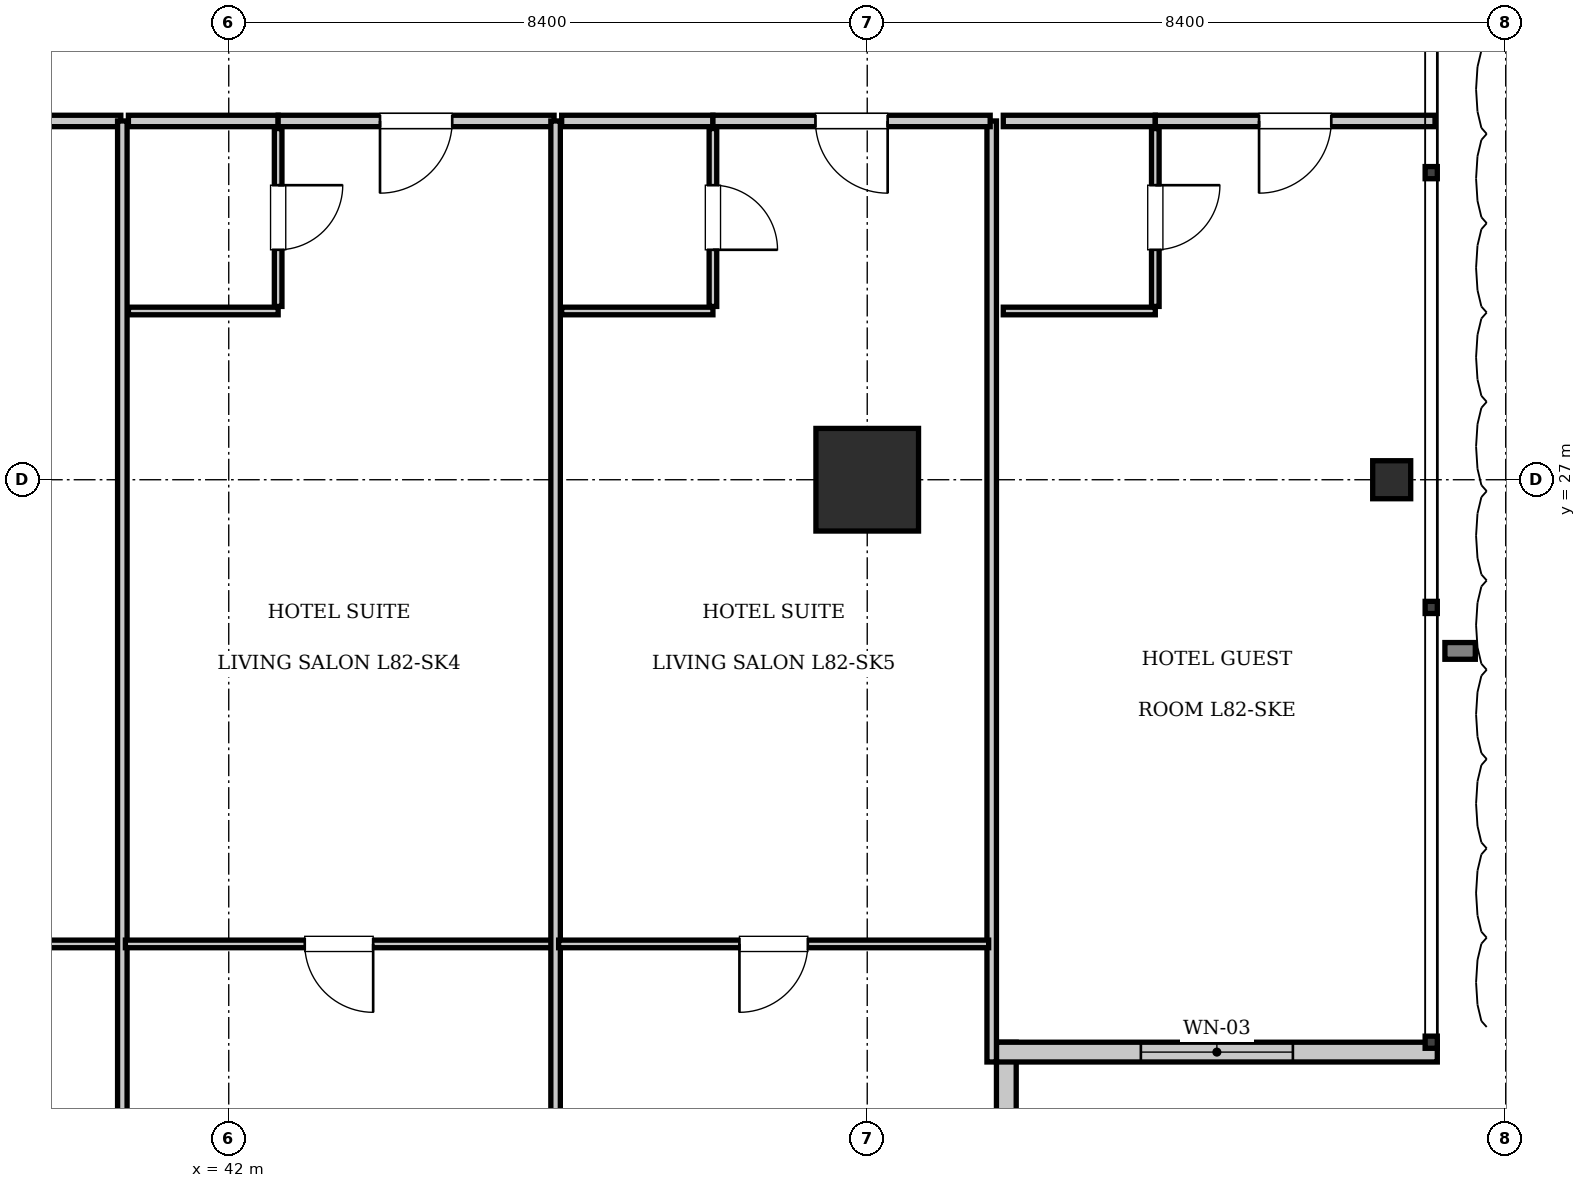
"""IFC4 building model, lengths in metres.
Left out: names, types, materials, properties, quantities, classifications, styles, units other than length and angle.
Written with IfcOpenShell. Run it as: python <this file> out.ifc"""

import sys

from ifc_helpers import new_model, si_unit, direction, frame, frame_2d, origin, origin_2d, place, context, subcontext, project, spatial, rectangle, i_section, extrude, element, fill, save


model = new_model("IFC4")
c1 = context("Model", 3, precision=1e-05, world=origin(), true_north=direction((0.0, 1.0)))
c2 = subcontext(c1, "Body", "Model", "MODEL_VIEW")
j1 = project(units=[si_unit("LENGTHUNIT", "METRE"), si_unit("PLANEANGLEUNIT", "RADIAN")], contexts=[c1])
p1 = place(None, origin())
s1 = spatial("IfcSite", under=j1, at=p1, CompositionType="ELEMENT")
p2 = place(p1, origin())
s2 = spatial("IfcBuilding", under=s1, at=p2, CompositionType="ELEMENT")
p3 = place(p2, frame((0.0, 0.0, 333.55)))
s3 = spatial("IfcBuildingStorey", under=s2, at=p3, CompositionType="ELEMENT", Elevation=333.55)
p4 = place(p3, frame((50.4, 27.0, 0.0), z_axis=(0.0, 0.0, 1.0), x_axis=(1.0, 0.0, 0.0)))
e1 = element("IfcColumn", 1, at=p4, inside=s3, PredefinedType="COLUMN", context=c2, shape_type="SweptSolid", body=[
    extrude(rectangle(XDim=1.35, YDim=1.35, at=origin_2d()), origin(), (0.0, 0.0, 1.0), 3.85),
])
p5 = place(p3, frame((57.3, 27.0, 0.0), z_axis=(0.0, 0.0, 1.0), x_axis=(1.0, 0.0, 0.0)))
e2 = element("IfcColumn", 2, at=p5, inside=s3, PredefinedType="COLUMN", context=c2, shape_type="SweptSolid", body=[
    extrude(i_section(OverallWidth=0.5, OverallDepth=0.5, WebThickness=0.022, FlangeThickness=0.032, at=origin_2d()), origin(), (0.0, 0.0, 1.0), 3.85),
])
p6 = place(p3, frame((52.23, 19.6, 0.0), z_axis=(0.0, 0.0, 1.0), x_axis=(0.0, -1.0, 0.0)))
e3 = element("IfcWall", 3, at=p6, inside=s3, PredefinedType="SOLIDWALL", context=c2, shape_type="SweptSolid", body=[
    extrude(rectangle(XDim=5.8, YDim=0.26, at=frame_2d((2.9, 0.0))), origin(), (0.0, 0.0, 1.0), 3.61),
])
p7 = place(p3, frame((57.9, 19.47, 0.0), z_axis=(0.0, 0.0, 1.0), x_axis=(-1.0, 0.0, 0.0)))
e4 = element("IfcWall", 4, at=p7, inside=s3, PredefinedType="SOLIDWALL", context=c2, shape_type="SweptSolid", body=[
    extrude(rectangle(XDim=5.8, YDim=0.26, at=frame_2d((2.9, 0.0))), origin(), (0.0, 0.0, 1.0), 3.61),
])
p8 = place(p7, frame((1.9, 0.0, 0.9)))
e5 = element("IfcOpeningElement", 5, at=p8, cuts=e4, PredefinedType="OPENING", context=c2, shape_type="SweptSolid", body=[
    extrude(rectangle(XDim=2.0, YDim=2.2, at=frame_2d((1.0, 1.1))), frame((0.0, 0.14, 0.0), z_axis=(0.0, -1.0, 0.0), x_axis=(1.0, 0.0, 0.0)), (0.0, 0.0, 1.0), 0.28),
])
p9 = place(p3, frame((52.038, 19.34, 0.0), z_axis=(0.0, 0.0, 1.0), x_axis=(0.0, 1.0, 0.0)))
e6 = element("IfcWall", 6, at=p9, inside=s3, PredefinedType="PARTITIONING", context=c2, shape_type="SweptSolid", body=[
    extrude(rectangle(XDim=12.38, YDim=0.125, at=frame_2d((6.19, 0.0))), origin(), (0.0, 0.0, 1.0), 3.61),
])
p10 = place(p3, frame((37.02, 31.72, 0.0), z_axis=(0.0, 0.0, 1.0), x_axis=(1.0, 0.0, 0.0)))
e7 = element("IfcWall", 7, at=p10, inside=s3, PredefinedType="PARTITIONING", context=c2, shape_type="SweptSolid", body=[
    extrude(rectangle(XDim=3.56, YDim=0.15, at=frame_2d((1.78, 0.0))), origin(), (0.0, 0.0, 1.0), 3.61),
])
p11 = place(p10, frame((1.305, 0.0, 0.0)))
e8 = element("IfcOpeningElement", 8, at=p11, cuts=e7, PredefinedType="OPENING", context=c2, shape_type="SweptSolid", body=[
    extrude(rectangle(XDim=0.95, YDim=2.15, at=frame_2d((0.475, 1.075))), frame((0.0, 0.085, 0.0), z_axis=(0.0, -1.0, 0.0), x_axis=(1.0, 0.0, 0.0)), (0.0, 0.0, 1.0), 0.17),
])
p12 = place(p3, frame((35.04, 20.893, 0.0), z_axis=(0.0, 0.0, 1.0), x_axis=(1.0, 0.0, 0.0)))
e9 = element("IfcWall", 9, at=p12, inside=s3, PredefinedType="PARTITIONING", context=c2, shape_type="SweptSolid", body=[
    extrude(rectangle(XDim=5.52, YDim=0.1, at=frame_2d((2.76, 0.0))), origin(), (0.0, 0.0, 1.0), 3.61),
])
p13 = place(p12, frame((2.31, 0.0, 0.0)))
e10 = element("IfcOpeningElement", 10, at=p13, cuts=e9, PredefinedType="OPENING", context=c2, shape_type="SweptSolid", body=[
    extrude(rectangle(XDim=0.9, YDim=2.1, at=frame_2d((0.45, 1.05))), frame((0.0, 0.06, 0.0), z_axis=(0.0, -1.0, 0.0), x_axis=(1.0, 0.0, 0.0)), (0.0, 0.0, 1.0), 0.12),
])
p14 = place(p3, frame((40.6, 13.9, 0.0), z_axis=(0.0, 0.0, 1.0), x_axis=(0.0, 1.0, 0.0)))
e11 = element("IfcWall", 11, at=p14, inside=s3, PredefinedType="PARTITIONING", context=c2, shape_type="SweptSolid", body=[
    extrude(rectangle(XDim=17.82, YDim=0.125, at=frame_2d((8.91, 0.0))), origin(), (0.0, 0.0, 1.0), 3.61),
])
p15 = place(p3, frame((40.68, 31.72, 0.0), z_axis=(0.0, 0.0, 1.0), x_axis=(1.0, 0.0, 0.0)))
e12 = element("IfcWall", 12, at=p15, inside=s3, PredefinedType="PARTITIONING", context=c2, shape_type="SweptSolid", body=[
    extrude(rectangle(XDim=1.97, YDim=0.15, at=frame_2d((0.985, 0.0))), origin(), (0.0, 0.0, 1.0), 3.61),
])
p16 = place(p3, frame((40.68, 29.22, 0.0), z_axis=(0.0, 0.0, 1.0), x_axis=(1.0, 0.0, 0.0)))
e13 = element("IfcWall", 13, at=p16, inside=s3, PredefinedType="PARTITIONING", context=c2, shape_type="SweptSolid", body=[
    extrude(rectangle(XDim=1.97, YDim=0.1, at=frame_2d((0.985, 0.0))), origin(), (0.0, 0.0, 1.0), 3.61),
])
p17 = place(p3, frame((42.65, 29.28, 0.0), z_axis=(0.0, 0.0, 1.0), x_axis=(0.0, 1.0, 0.0)))
e14 = element("IfcWall", 14, at=p17, inside=s3, PredefinedType="PARTITIONING", context=c2, shape_type="SweptSolid", body=[
    extrude(rectangle(XDim=2.34, YDim=0.1, at=frame_2d((1.17, 0.0))), origin(), (0.0, 0.0, 1.0), 3.61),
])
p18 = place(p17, frame((0.745, 0.0, 0.0)))
e15 = element("IfcOpeningElement", 15, at=p18, cuts=e14, PredefinedType="OPENING", context=c2, shape_type="SweptSolid", body=[
    extrude(rectangle(XDim=0.85, YDim=2.1, at=frame_2d((0.425, 1.05))), frame((0.0, 0.06, 0.0), z_axis=(0.0, -1.0, 0.0), x_axis=(1.0, 0.0, 0.0)), (0.0, 0.0, 1.0), 0.12),
])
p19 = place(p3, frame((42.65, 31.72, 0.0), z_axis=(0.0, 0.0, 1.0), x_axis=(1.0, 0.0, 0.0)))
e16 = element("IfcWall", 16, at=p19, inside=s3, PredefinedType="PARTITIONING", context=c2, shape_type="SweptSolid", body=[
    extrude(rectangle(XDim=3.63, YDim=0.15, at=frame_2d((1.815, 0.0))), origin(), (0.0, 0.0, 1.0), 3.61),
])
p20 = place(p19, frame((1.34, 0.0, 0.0)))
e17 = element("IfcOpeningElement", 17, at=p20, cuts=e16, PredefinedType="OPENING", context=c2, shape_type="SweptSolid", body=[
    extrude(rectangle(XDim=0.95, YDim=2.15, at=frame_2d((0.475, 1.075))), frame((0.0, 0.085, 0.0), z_axis=(0.0, -1.0, 0.0), x_axis=(1.0, 0.0, 0.0)), (0.0, 0.0, 1.0), 0.17),
])
p21 = place(p3, frame((40.64, 20.893, 0.0), z_axis=(0.0, 0.0, 1.0), x_axis=(1.0, 0.0, 0.0)))
e18 = element("IfcWall", 18, at=p21, inside=s3, PredefinedType="PARTITIONING", context=c2, shape_type="SweptSolid", body=[
    extrude(rectangle(XDim=5.62, YDim=0.1, at=frame_2d((2.81, 0.0))), origin(), (0.0, 0.0, 1.0), 3.61),
])
p22 = place(p21, frame((2.36, 0.0, 0.0)))
e19 = element("IfcOpeningElement", 19, at=p22, cuts=e18, PredefinedType="OPENING", context=c2, shape_type="SweptSolid", body=[
    extrude(rectangle(XDim=0.9, YDim=2.1, at=frame_2d((0.45, 1.05))), frame((0.0, 0.06, 0.0), z_axis=(0.0, -1.0, 0.0), x_axis=(1.0, 0.0, 0.0)), (0.0, 0.0, 1.0), 0.12),
])
p23 = place(p3, frame((46.3, 13.9, 0.0), z_axis=(0.0, 0.0, 1.0), x_axis=(0.0, 1.0, 0.0)))
e20 = element("IfcWall", 20, at=p23, inside=s3, PredefinedType="PARTITIONING", context=c2, shape_type="SweptSolid", body=[
    extrude(rectangle(XDim=17.82, YDim=0.125, at=frame_2d((8.91, 0.0))), origin(), (0.0, 0.0, 1.0), 3.403),
])
p24 = place(p3, frame((46.38, 31.72, 0.0), z_axis=(0.0, 0.0, 1.0), x_axis=(1.0, 0.0, 0.0)))
e21 = element("IfcWall", 21, at=p24, inside=s3, PredefinedType="PARTITIONING", context=c2, shape_type="SweptSolid", body=[
    extrude(rectangle(XDim=1.99, YDim=0.15, at=frame_2d((0.995, 0.0))), origin(), (0.0, 0.0, 1.0), 3.61),
])
p25 = place(p3, frame((46.38, 29.22, 0.0), z_axis=(0.0, 0.0, 1.0), x_axis=(1.0, 0.0, 0.0)))
e22 = element("IfcWall", 22, at=p25, inside=s3, PredefinedType="PARTITIONING", context=c2, shape_type="SweptSolid", body=[
    extrude(rectangle(XDim=1.99, YDim=0.1, at=frame_2d((0.995, 0.0))), origin(), (0.0, 0.0, 1.0), 3.61),
])
p26 = place(p3, frame((48.37, 29.28, 0.0), z_axis=(0.0, 0.0, 1.0), x_axis=(0.0, 1.0, 0.0)))
e23 = element("IfcWall", 23, at=p26, inside=s3, PredefinedType="PARTITIONING", context=c2, shape_type="SweptSolid", body=[
    extrude(rectangle(XDim=2.34, YDim=0.1, at=frame_2d((1.17, 0.0))), origin(), (0.0, 0.0, 1.0), 3.61),
])
p27 = place(p26, frame((0.745, 0.0, 0.0)))
e24 = element("IfcOpeningElement", 24, at=p27, cuts=e23, PredefinedType="OPENING", context=c2, shape_type="SweptSolid", body=[
    extrude(rectangle(XDim=0.85, YDim=2.1, at=frame_2d((0.425, 1.05))), frame((0.0, 0.06, 0.0), z_axis=(0.0, -1.0, 0.0), x_axis=(1.0, 0.0, 0.0)), (0.0, 0.0, 1.0), 0.12),
])
p28 = place(p3, frame((48.37, 31.72, 0.0), z_axis=(0.0, 0.0, 1.0), x_axis=(1.0, 0.0, 0.0)))
e25 = element("IfcWall", 25, at=p28, inside=s3, PredefinedType="PARTITIONING", context=c2, shape_type="SweptSolid", body=[
    extrude(rectangle(XDim=3.647, YDim=0.15, at=frame_2d((1.824, 0.0))), origin(), (0.0, 0.0, 1.0), 3.61),
])
p29 = place(p28, frame((1.349, 0.0, 0.0)))
e26 = element("IfcOpeningElement", 26, at=p29, cuts=e25, PredefinedType="OPENING", context=c2, shape_type="SweptSolid", body=[
    extrude(rectangle(XDim=0.95, YDim=2.15, at=frame_2d((0.475, 1.075))), frame((0.0, 0.085, 0.0), z_axis=(0.0, -1.0, 0.0), x_axis=(1.0, 0.0, 0.0)), (0.0, 0.0, 1.0), 0.17),
])
p30 = place(p3, frame((46.34, 20.893, 0.0), z_axis=(0.0, 0.0, 1.0), x_axis=(1.0, 0.0, 0.0)))
e27 = element("IfcWall", 27, at=p30, inside=s3, PredefinedType="PARTITIONING", context=c2, shape_type="SweptSolid", body=[
    extrude(rectangle(XDim=5.657, YDim=0.1, at=frame_2d((2.829, 0.0))), origin(), (0.0, 0.0, 1.0), 3.61),
])
p31 = place(p30, frame((2.379, 0.0, 0.0)))
e28 = element("IfcOpeningElement", 28, at=p31, cuts=e27, PredefinedType="OPENING", context=c2, shape_type="SweptSolid", body=[
    extrude(rectangle(XDim=0.9, YDim=2.1, at=frame_2d((0.45, 1.05))), frame((0.0, 0.06, 0.0), z_axis=(0.0, -1.0, 0.0), x_axis=(1.0, 0.0, 0.0)), (0.0, 0.0, 1.0), 0.12),
])
p32 = place(p3, frame((52.19, 31.72, 0.0), z_axis=(0.0, 0.0, 1.0), x_axis=(1.0, 0.0, 0.0)))
e29 = element("IfcWall", 29, at=p32, inside=s3, PredefinedType="PARTITIONING", context=c2, shape_type="SweptSolid", body=[
    extrude(rectangle(XDim=2.0, YDim=0.15, at=frame_2d((1.0, 0.0))), origin(), (0.0, 0.0, 1.0), 3.61),
])
p33 = place(p3, frame((52.19, 29.22, 0.0), z_axis=(0.0, 0.0, 1.0), x_axis=(1.0, 0.0, 0.0)))
e30 = element("IfcWall", 30, at=p33, inside=s3, PredefinedType="PARTITIONING", context=c2, shape_type="SweptSolid", body=[
    extrude(rectangle(XDim=2.0, YDim=0.1, at=frame_2d((1.0, 0.0))), origin(), (0.0, 0.0, 1.0), 3.61),
])
p34 = place(p3, frame((54.19, 29.28, 0.0), z_axis=(0.0, 0.0, 1.0), x_axis=(0.0, 1.0, 0.0)))
e31 = element("IfcWall", 31, at=p34, inside=s3, PredefinedType="PARTITIONING", context=c2, shape_type="SweptSolid", body=[
    extrude(rectangle(XDim=2.34, YDim=0.1, at=frame_2d((1.17, 0.0))), origin(), (0.0, 0.0, 1.0), 3.61),
])
p35 = place(p34, frame((0.745, 0.0, 0.0)))
e32 = element("IfcOpeningElement", 32, at=p35, cuts=e31, PredefinedType="OPENING", context=c2, shape_type="SweptSolid", body=[
    extrude(rectangle(XDim=0.85, YDim=2.1, at=frame_2d((0.425, 1.05))), frame((0.0, 0.06, 0.0), z_axis=(0.0, -1.0, 0.0), x_axis=(1.0, 0.0, 0.0)), (0.0, 0.0, 1.0), 0.12),
])
p36 = place(p3, frame((54.19, 31.72, 0.0), z_axis=(0.0, 0.0, 1.0), x_axis=(1.0, 0.0, 0.0)))
e33 = element("IfcWall", 33, at=p36, inside=s3, PredefinedType="PARTITIONING", context=c2, shape_type="SweptSolid", body=[
    extrude(rectangle(XDim=3.68, YDim=0.15, at=frame_2d((1.84, 0.0))), origin(), (0.0, 0.0, 1.0), 3.61),
])
p37 = place(p36, frame((1.365, 0.0, 0.0)))
e34 = element("IfcOpeningElement", 34, at=p37, cuts=e33, PredefinedType="OPENING", context=c2, shape_type="SweptSolid", body=[
    extrude(rectangle(XDim=0.95, YDim=2.15, at=frame_2d((0.475, 1.075))), frame((0.0, 0.085, 0.0), z_axis=(0.0, -1.0, 0.0), x_axis=(1.0, 0.0, 0.0)), (0.0, 0.0, 1.0), 0.17),
])
p38 = place(p8, origin())
e35 = element("IfcWindow", 35, at=p38, inside=s3, PartitioningType="SINGLE_PANEL", PredefinedType="WINDOW", context=c2, shape_type="SweptSolid", body=[
    extrude(rectangle(XDim=2.0, YDim=2.2, at=frame_2d((1.0, 1.1))), frame((0.0, 0.03, 0.0), z_axis=(0.0, -1.0, 0.0), x_axis=(1.0, 0.0, 0.0)), (0.0, 0.0, 1.0), 0.06),
])
fill(e5, e35)
p39 = place(p18, frame((0.85, 0.0, 0.0), z_axis=(0.0, 0.0, 1.0), x_axis=(-1.0, 0.0, 0.0)))
e36 = element("IfcDoor", 36, at=p39, inside=s3, OperationType="SINGLE_SWING_LEFT", PredefinedType="DOOR", context=c2, shape_type="SweptSolid", body=[
    extrude(rectangle(XDim=0.85, YDim=2.1, at=frame_2d((0.425, 1.05))), frame((0.0, 0.025, 0.0), z_axis=(0.0, -1.0, 0.0), x_axis=(1.0, 0.0, 0.0)), (0.0, 0.0, 1.0), 0.05),
])
fill(e15, e36)
p40 = place(p20, frame((0.95, 0.0, 0.0), z_axis=(0.0, 0.0, 1.0), x_axis=(-1.0, 0.0, 0.0)))
e37 = element("IfcDoor", 37, at=p40, inside=s3, OperationType="SINGLE_SWING_RIGHT", PredefinedType="DOOR", context=c2, shape_type="SweptSolid", body=[
    extrude(rectangle(XDim=0.95, YDim=2.15, at=frame_2d((0.475, 1.075))), frame((0.0, 0.025, 0.0), z_axis=(0.0, -1.0, 0.0), x_axis=(1.0, 0.0, 0.0)), (0.0, 0.0, 1.0), 0.05),
])
fill(e17, e37)
p41 = place(p22, frame((0.9, 0.0, 0.0), z_axis=(0.0, 0.0, 1.0), x_axis=(-1.0, 0.0, 0.0)))
e38 = element("IfcDoor", 38, at=p41, inside=s3, OperationType="SINGLE_SWING_LEFT", PredefinedType="DOOR", context=c2, shape_type="SweptSolid", body=[
    extrude(rectangle(XDim=0.9, YDim=2.1, at=frame_2d((0.45, 1.05))), frame((0.0, 0.025, 0.0), z_axis=(0.0, -1.0, 0.0), x_axis=(1.0, 0.0, 0.0)), (0.0, 0.0, 1.0), 0.05),
])
fill(e19, e38)
p42 = place(p27, frame((0.85, 0.0, 0.0), z_axis=(0.0, 0.0, 1.0), x_axis=(-1.0, 0.0, 0.0)))
e39 = element("IfcDoor", 39, at=p42, inside=s3, OperationType="SINGLE_SWING_RIGHT", PredefinedType="DOOR", context=c2, shape_type="SweptSolid", body=[
    extrude(rectangle(XDim=0.85, YDim=2.1, at=frame_2d((0.425, 1.05))), frame((0.0, 0.025, 0.0), z_axis=(0.0, -1.0, 0.0), x_axis=(1.0, 0.0, 0.0)), (0.0, 0.0, 1.0), 0.05),
])
fill(e24, e39)
p43 = place(p29, frame((0.95, 0.0, 0.0), z_axis=(0.0, 0.0, 1.0), x_axis=(-1.0, 0.0, 0.0)))
e40 = element("IfcDoor", 40, at=p43, inside=s3, OperationType="SINGLE_SWING_LEFT", PredefinedType="DOOR", context=c2, shape_type="SweptSolid", body=[
    extrude(rectangle(XDim=0.95, YDim=2.15, at=frame_2d((0.475, 1.075))), frame((0.0, 0.025, 0.0), z_axis=(0.0, -1.0, 0.0), x_axis=(1.0, 0.0, 0.0)), (0.0, 0.0, 1.0), 0.05),
])
fill(e26, e40)
p44 = place(p31, frame((0.9, 0.0, 0.0), z_axis=(0.0, 0.0, 1.0), x_axis=(-1.0, 0.0, 0.0)))
e41 = element("IfcDoor", 41, at=p44, inside=s3, OperationType="SINGLE_SWING_RIGHT", PredefinedType="DOOR", context=c2, shape_type="SweptSolid", body=[
    extrude(rectangle(XDim=0.9, YDim=2.1, at=frame_2d((0.45, 1.05))), frame((0.0, 0.025, 0.0), z_axis=(0.0, -1.0, 0.0), x_axis=(1.0, 0.0, 0.0)), (0.0, 0.0, 1.0), 0.05),
])
fill(e28, e41)
p45 = place(p35, frame((0.85, 0.0, 0.0), z_axis=(0.0, 0.0, 1.0), x_axis=(-1.0, 0.0, 0.0)))
e42 = element("IfcDoor", 42, at=p45, inside=s3, OperationType="SINGLE_SWING_LEFT", PredefinedType="DOOR", context=c2, shape_type="SweptSolid", body=[
    extrude(rectangle(XDim=0.85, YDim=2.1, at=frame_2d((0.425, 1.05))), frame((0.0, 0.025, 0.0), z_axis=(0.0, -1.0, 0.0), x_axis=(1.0, 0.0, 0.0)), (0.0, 0.0, 1.0), 0.05),
])
fill(e32, e42)
p46 = place(p37, frame((0.95, 0.0, 0.0), z_axis=(0.0, 0.0, 1.0), x_axis=(-1.0, 0.0, 0.0)))
e43 = element("IfcDoor", 43, at=p46, inside=s3, OperationType="SINGLE_SWING_RIGHT", PredefinedType="DOOR", context=c2, shape_type="SweptSolid", body=[
    extrude(rectangle(XDim=0.95, YDim=2.15, at=frame_2d((0.475, 1.075))), frame((0.0, 0.025, 0.0), z_axis=(0.0, -1.0, 0.0), x_axis=(1.0, 0.0, 0.0)), (0.0, 0.0, 1.0), 0.05),
])
fill(e34, e43)
save(model, sys.argv[1])
